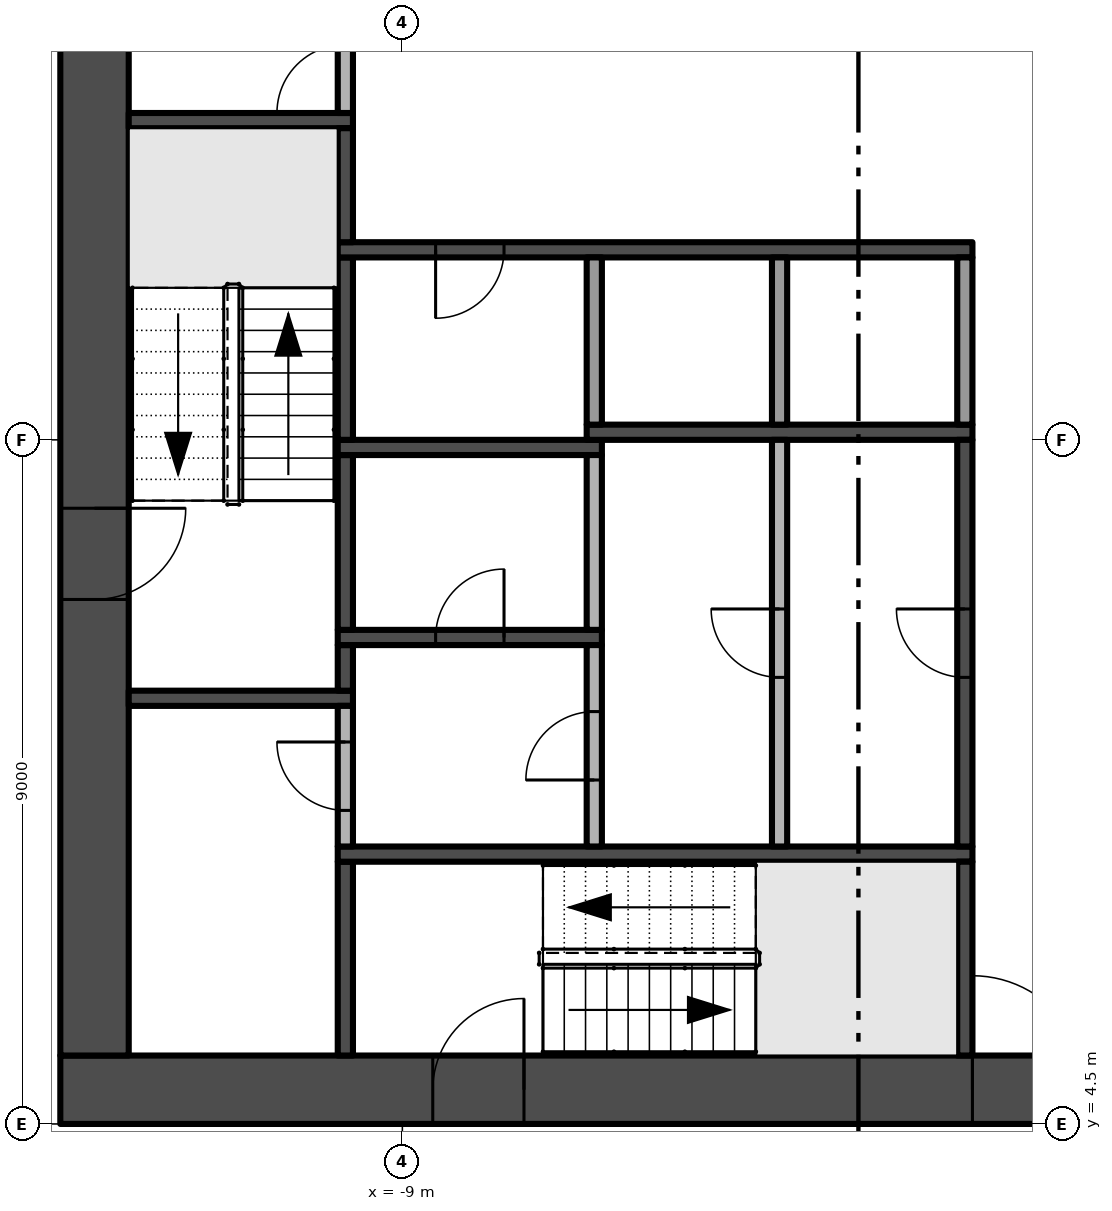
"""IFC4 building model, lengths in metres.
Left out: names, types, materials, properties, quantities, classifications, styles, units other than length and angle.
Written with IfcOpenShell. Run it as: python <this file> out.ifc"""

import sys

from ifc_helpers import new_model, si_unit, direction, frame, frame_2d, origin, place, context, subcontext, project, spatial, rectangle, extrude, element, fill, save


model = new_model("IFC4")
c1 = context("Model", 3, precision=1e-05, world=origin(), true_north=direction((0.0, 1.0)))
c2 = subcontext(c1, "Body", "Model", "MODEL_VIEW")
j1 = project(units=[si_unit("LENGTHUNIT", "METRE"), si_unit("PLANEANGLEUNIT", "RADIAN")], contexts=[c1])
p1 = place(None, origin())
s1 = spatial("IfcSite", under=j1, at=p1, CompositionType="ELEMENT")
p2 = place(p1, origin())
s2 = spatial("IfcBuilding", under=s1, at=p2, CompositionType="ELEMENT")
p3 = place(p2, frame((0.0, 0.0, 84.6)))
s3 = spatial("IfcBuildingStorey", under=s2, at=p3, CompositionType="ELEMENT", Elevation=84.6)
p4 = place(p3, frame((-13.5, 4.95, -0.3), z_axis=(0.0, 0.0, 1.0), x_axis=(1.0, 0.0, 0.0)))
e1 = element("IfcWall", 1, at=p4, inside=s3, PredefinedType="SHEAR", context=c2, shape_type="SweptSolid", body=[
    extrude(rectangle(XDim=27.0, YDim=0.9, at=frame_2d((13.5, 0.0))), origin(), (0.0, 0.0, 1.0), 3.8),
])
p5 = place(p4, frame((12.0, 0.0, 0.3)))
e2 = element("IfcOpeningElement", 2, at=p5, cuts=e1, PredefinedType="OPENING", context=c2, shape_type="SweptSolid", body=[
    extrude(rectangle(XDim=3.0, YDim=2.4, at=frame_2d((1.5, 1.2))), frame((0.0, 0.46, 0.0), z_axis=(0.0, -1.0, 0.0), x_axis=(1.0, 0.0, 0.0)), (0.0, 0.0, 1.0), 0.92),
])
p6 = place(p4, frame((4.9, 0.0, 0.3)))
e3 = element("IfcOpeningElement", 3, at=p6, cuts=e1, PredefinedType="OPENING", context=c2, shape_type="SweptSolid", body=[
    extrude(rectangle(XDim=1.2, YDim=2.2, at=frame_2d((0.6, 1.1))), frame((0.0, 0.46, 0.0), z_axis=(0.0, -1.0, 0.0), x_axis=(1.0, 0.0, 0.0)), (0.0, 0.0, 1.0), 0.92),
])
p7 = place(p4, frame((20.75, 0.0, 0.3)))
e4 = element("IfcOpeningElement", 4, at=p7, cuts=e1, PredefinedType="OPENING", context=c2, shape_type="SweptSolid", body=[
    extrude(rectangle(XDim=1.5, YDim=2.2, at=frame_2d((0.75, 1.1))), frame((0.0, 0.46, 0.0), z_axis=(0.0, -1.0, 0.0), x_axis=(1.0, 0.0, 0.0)), (0.0, 0.0, 1.0), 0.92),
])
p8 = place(p4, frame((17.4, 0.0, 0.3)))
e5 = element("IfcOpeningElement", 5, at=p8, cuts=e1, PredefinedType="OPENING", context=c2, shape_type="SweptSolid", body=[
    extrude(rectangle(XDim=1.2, YDim=2.2, at=frame_2d((0.6, 1.1))), frame((0.0, 0.46, 0.0), z_axis=(0.0, -1.0, 0.0), x_axis=(1.0, 0.0, 0.0)), (0.0, 0.0, 1.0), 0.92),
])
p9 = place(p3, frame((-13.05, 21.6, -0.3), z_axis=(0.0, 0.0, 1.0), x_axis=(0.0, -1.0, 0.0)))
e6 = element("IfcWall", 6, at=p9, inside=s3, PredefinedType="SHEAR", context=c2, shape_type="SweptSolid", body=[
    extrude(rectangle(XDim=16.2, YDim=0.9, at=frame_2d((8.1, 0.0))), origin(), (0.0, 0.0, 1.0), 3.8),
])
p10 = place(p9, frame((9.0, 0.0, 0.3)))
e7 = element("IfcOpeningElement", 7, at=p10, cuts=e6, PredefinedType="OPENING", context=c2, shape_type="SweptSolid", body=[
    extrude(rectangle(XDim=1.2, YDim=2.2, at=frame_2d((0.6, 1.1))), frame((0.0, 0.46, 0.0), z_axis=(0.0, -1.0, 0.0), x_axis=(1.0, 0.0, 0.0)), (0.0, 0.0, 1.0), 0.92),
])
for number, where, z_axis, x_axis in (
    (8, (-12.6, 10.1, 0.0), (0.0, 0.0, 1.0), (1.0, 0.0, 0.0)),
    (9, (-12.6, 17.7, 0.0), (0.0, 0.0, 1.0), (1.0, 0.0, 0.0)),
):
    element("IfcWall", number, at=place(p3, frame(where, z_axis=z_axis, x_axis=x_axis)), inside=s3, PredefinedType="SHEAR", context=c2, shape_type="SweptSolid", body=[
        extrude(rectangle(XDim=2.95, YDim=0.2, at=frame_2d((1.475, 0.0))), origin(), (0.0, 0.0, 1.0), 3.5),
    ])
p11 = place(p3, frame((-9.75, 5.4, 0.0), z_axis=(0.0, 0.0, 1.0), x_axis=(0.0, 1.0, 0.0)))
e10 = element("IfcWall", 10, at=p11, inside=s3, PredefinedType="SHEAR", context=c2, shape_type="SweptSolid", body=[
    extrude(rectangle(XDim=2.55, YDim=0.2, at=frame_2d((1.275, 0.0))), origin(), (0.0, 0.0, 1.0), 3.5),
])
p12 = place(p3, frame((-9.85, 8.05, 0.0), z_axis=(0.0, 0.0, 1.0), x_axis=(1.0, 0.0, 0.0)))
e11 = element("IfcWall", 11, at=p12, inside=s3, PredefinedType="SHEAR", context=c2, shape_type="SweptSolid", body=[
    extrude(rectangle(XDim=8.35, YDim=0.2, at=frame_2d((4.175, 0.0))), origin(), (0.0, 0.0, 1.0), 3.5),
])
p13 = place(p3, frame((-9.75, 8.15, 0.0), z_axis=(0.0, 0.0, 1.0), x_axis=(0.0, 1.0, 0.0)))
e12 = element("IfcWall", 12, at=p13, inside=s3, PredefinedType="PARTITIONING", context=c2, shape_type="SweptSolid", body=[
    extrude(rectangle(XDim=1.85, YDim=0.2, at=frame_2d((0.925, 0.0))), origin(), (0.0, 0.0, 1.0), 3.5),
])
p14 = place(p13, frame((0.475, 0.0, 0.0)))
e13 = element("IfcOpeningElement", 13, at=p14, cuts=e12, PredefinedType="OPENING", context=c2, shape_type="SweptSolid", body=[
    extrude(rectangle(XDim=0.9, YDim=2.1, at=frame_2d((0.45, 1.05))), frame((0.0, 0.11, 0.0), z_axis=(0.0, -1.0, 0.0), x_axis=(1.0, 0.0, 0.0)), (0.0, 0.0, 1.0), 0.22),
])
p15 = place(p3, frame((-9.75, 10.2, 0.0), z_axis=(0.0, 0.0, 1.0), x_axis=(0.0, 1.0, 0.0)))
e14 = element("IfcWall", 14, at=p15, inside=s3, PredefinedType="SHEAR", context=c2, shape_type="SweptSolid", body=[
    extrude(rectangle(XDim=0.6, YDim=0.2, at=frame_2d((0.3, 0.0))), origin(), (0.0, 0.0, 1.0), 3.5),
])
p16 = place(p3, frame((-9.85, 10.9, 0.0), z_axis=(0.0, 0.0, 1.0), x_axis=(1.0, 0.0, 0.0)))
e15 = element("IfcWall", 15, at=p16, inside=s3, PredefinedType="SHEAR", context=c2, shape_type="SweptSolid", body=[
    extrude(rectangle(XDim=3.475, YDim=0.2, at=frame_2d((1.738, 0.0))), origin(), (0.0, 0.0, 1.0), 3.5),
])
p17 = place(p16, frame((1.288, 0.0, 0.0)))
e16 = element("IfcOpeningElement", 16, at=p17, cuts=e15, PredefinedType="OPENING", context=c2, shape_type="SweptSolid", body=[
    extrude(rectangle(XDim=0.9, YDim=2.1, at=frame_2d((0.45, 1.05))), frame((0.0, 0.11, 0.0), z_axis=(0.0, -1.0, 0.0), x_axis=(1.0, 0.0, 0.0)), (0.0, 0.0, 1.0), 0.22),
])
p18 = place(p3, frame((-9.75, 11.0, 0.0), z_axis=(0.0, 0.0, 1.0), x_axis=(0.0, 1.0, 0.0)))
e17 = element("IfcWall", 17, at=p18, inside=s3, PredefinedType="SHEAR", context=c2, shape_type="SweptSolid", body=[
    extrude(rectangle(XDim=2.3, YDim=0.2, at=frame_2d((1.15, 0.0))), origin(), (0.0, 0.0, 1.0), 3.5),
])
p19 = place(p3, frame((-9.85, 13.4, 0.0), z_axis=(0.0, 0.0, 1.0), x_axis=(1.0, 0.0, 0.0)))
e18 = element("IfcWall", 18, at=p19, inside=s3, PredefinedType="SHEAR", context=c2, shape_type="SweptSolid", body=[
    extrude(rectangle(XDim=3.475, YDim=0.2, at=frame_2d((1.738, 0.0))), origin(), (0.0, 0.0, 1.0), 3.5),
])
p20 = place(p3, frame((-9.75, 13.5, 0.0), z_axis=(0.0, 0.0, 1.0), x_axis=(0.0, 1.0, 0.0)))
e19 = element("IfcWall", 19, at=p20, inside=s3, PredefinedType="SHEAR", context=c2, shape_type="SweptSolid", body=[
    extrude(rectangle(XDim=2.4, YDim=0.2, at=frame_2d((1.2, 0.0))), origin(), (0.0, 0.0, 1.0), 3.5),
])
p21 = place(p3, frame((-1.5, 16.0, 0.0), z_axis=(0.0, 0.0, 1.0), x_axis=(-1.0, 0.0, 0.0)))
e20 = element("IfcWall", 20, at=p21, inside=s3, PredefinedType="SHEAR", context=c2, shape_type="SweptSolid", body=[
    extrude(rectangle(XDim=8.35, YDim=0.2, at=frame_2d((4.175, 0.0))), origin(), (0.0, 0.0, 1.0), 3.5),
])
p22 = place(p21, frame((6.162, 0.0, 0.0)))
e21 = element("IfcOpeningElement", 21, at=p22, cuts=e20, PredefinedType="OPENING", context=c2, shape_type="SweptSolid", body=[
    extrude(rectangle(XDim=0.9, YDim=2.1, at=frame_2d((0.45, 1.05))), frame((0.0, 0.11, 0.0), z_axis=(0.0, -1.0, 0.0), x_axis=(1.0, 0.0, 0.0)), (0.0, 0.0, 1.0), 0.22),
])
p23 = place(p3, frame((-9.75, 16.1, 0.0), z_axis=(0.0, 0.0, 1.0), x_axis=(0.0, 1.0, 0.0)))
e22 = element("IfcWall", 22, at=p23, inside=s3, PredefinedType="SHEAR", context=c2, shape_type="SweptSolid", body=[
    extrude(rectangle(XDim=1.5, YDim=0.2, at=frame_2d((0.75, 0.0))), origin(), (0.0, 0.0, 1.0), 3.5),
])
p24 = place(p3, frame((-9.75, 17.8, 0.0), z_axis=(0.0, 0.0, 1.0), x_axis=(0.0, 1.0, 0.0)))
e23 = element("IfcWall", 23, at=p24, inside=s3, PredefinedType="PARTITIONING", context=c2, shape_type="SweptSolid", body=[
    extrude(rectangle(XDim=1.4, YDim=0.2, at=frame_2d((0.7, 0.0))), origin(), (0.0, 0.0, 1.0), 3.5),
])
p25 = place(p24, origin())
e24 = element("IfcOpeningElement", 24, at=p25, cuts=e23, PredefinedType="OPENING", context=c2, shape_type="SweptSolid", body=[
    extrude(rectangle(XDim=0.9, YDim=2.1, at=frame_2d((0.45, 1.05))), frame((0.0, 0.11, 0.0), z_axis=(0.0, -1.0, 0.0), x_axis=(1.0, 0.0, 0.0)), (0.0, 0.0, 1.0), 0.22),
])
p26 = place(p3, frame((-6.475, 8.15, 0.0), z_axis=(0.0, 0.0, 1.0), x_axis=(0.0, 1.0, 0.0)))
e25 = element("IfcWall", 25, at=p26, inside=s3, PredefinedType="PARTITIONING", context=c2, shape_type="SweptSolid", body=[
    extrude(rectangle(XDim=2.65, YDim=0.2, at=frame_2d((1.325, 0.0))), origin(), (0.0, 0.0, 1.0), 3.5),
])
p27 = place(p26, frame((0.875, 0.0, 0.0)))
e26 = element("IfcOpeningElement", 26, at=p27, cuts=e25, PredefinedType="OPENING", context=c2, shape_type="SweptSolid", body=[
    extrude(rectangle(XDim=0.9, YDim=2.1, at=frame_2d((0.45, 1.05))), frame((0.0, 0.11, 0.0), z_axis=(0.0, -1.0, 0.0), x_axis=(1.0, 0.0, 0.0)), (0.0, 0.0, 1.0), 0.22),
])
p28 = place(p3, frame((-6.475, 11.0, 0.0), z_axis=(0.0, 0.0, 1.0), x_axis=(0.0, 1.0, 0.0)))
e27 = element("IfcWall", 27, at=p28, inside=s3, PredefinedType="PARTITIONING", context=c2, shape_type="SweptSolid", body=[
    extrude(rectangle(XDim=2.3, YDim=0.2, at=frame_2d((1.15, 0.0))), origin(), (0.0, 0.0, 1.0), 3.5),
])
p29 = place(p3, frame((-6.575, 13.6, 0.0), z_axis=(0.0, 0.0, 1.0), x_axis=(1.0, 0.0, 0.0)))
e28 = element("IfcWall", 28, at=p29, inside=s3, PredefinedType="SHEAR", context=c2, shape_type="SweptSolid", body=[
    extrude(rectangle(XDim=5.075, YDim=0.2, at=frame_2d((2.538, 0.0))), origin(), (0.0, 0.0, 1.0), 3.5),
])
p30 = place(p3, frame((-6.475, 13.7, 0.0), z_axis=(0.0, 0.0, 1.0), x_axis=(0.0, 1.0, 0.0)))
e29 = element("IfcWall", 29, at=p30, inside=s3, PredefinedType="PARTITIONING", context=c2, shape_type="SweptSolid", body=[
    extrude(rectangle(XDim=2.2, YDim=0.2, at=frame_2d((1.1, 0.0))), origin(), (0.0, 0.0, 1.0), 3.5),
])
p31 = place(p3, frame((-4.037, 8.15, 0.0), z_axis=(0.0, 0.0, 1.0), x_axis=(0.0, 1.0, 0.0)))
e30 = element("IfcWall", 30, at=p31, inside=s3, PredefinedType="PARTITIONING", context=c2, shape_type="SweptSolid", body=[
    extrude(rectangle(XDim=5.35, YDim=0.2, at=frame_2d((2.675, 0.0))), origin(), (0.0, 0.0, 1.0), 3.5),
])
p32 = place(p31, frame((2.225, 0.0, 0.0)))
e31 = element("IfcOpeningElement", 31, at=p32, cuts=e30, PredefinedType="OPENING", context=c2, shape_type="SweptSolid", body=[
    extrude(rectangle(XDim=0.9, YDim=2.1, at=frame_2d((0.45, 1.05))), frame((0.0, 0.11, 0.0), z_axis=(0.0, -1.0, 0.0), x_axis=(1.0, 0.0, 0.0)), (0.0, 0.0, 1.0), 0.22),
])
p33 = place(p3, frame((-4.037, 13.7, 0.0), z_axis=(0.0, 0.0, 1.0), x_axis=(0.0, 1.0, 0.0)))
e32 = element("IfcWall", 32, at=p33, inside=s3, PredefinedType="PARTITIONING", context=c2, shape_type="SweptSolid", body=[
    extrude(rectangle(XDim=2.2, YDim=0.2, at=frame_2d((1.1, 0.0))), origin(), (0.0, 0.0, 1.0), 3.5),
])
p34 = place(p3, frame((-1.6, 5.4, 0.0), z_axis=(0.0, 0.0, 1.0), x_axis=(0.0, 1.0, 0.0)))
e33 = element("IfcWall", 33, at=p34, inside=s3, PredefinedType="SHEAR", context=c2, shape_type="SweptSolid", body=[
    extrude(rectangle(XDim=2.55, YDim=0.2, at=frame_2d((1.275, 0.0))), origin(), (0.0, 0.0, 1.0), 3.5),
])
p35 = place(p3, frame((-1.6, 8.15, 0.0), z_axis=(0.0, 0.0, 1.0), x_axis=(0.0, 1.0, 0.0)))
e34 = element("IfcWall", 34, at=p35, inside=s3, PredefinedType="SHEAR", context=c2, shape_type="SweptSolid", body=[
    extrude(rectangle(XDim=5.35, YDim=0.2, at=frame_2d((2.675, 0.0))), origin(), (0.0, 0.0, 1.0), 3.5),
])
p36 = place(p35, frame((2.225, 0.0, 0.0)))
e35 = element("IfcOpeningElement", 35, at=p36, cuts=e34, PredefinedType="OPENING", context=c2, shape_type="SweptSolid", body=[
    extrude(rectangle(XDim=0.9, YDim=2.1, at=frame_2d((0.45, 1.05))), frame((0.0, 0.11, 0.0), z_axis=(0.0, -1.0, 0.0), x_axis=(1.0, 0.0, 0.0)), (0.0, 0.0, 1.0), 0.22),
])
p37 = place(p3, frame((-1.6, 13.7, 0.0), z_axis=(0.0, 0.0, 1.0), x_axis=(0.0, 1.0, 0.0)))
e36 = element("IfcWall", 36, at=p37, inside=s3, PredefinedType="PARTITIONING", context=c2, shape_type="SweptSolid", body=[
    extrude(rectangle(XDim=2.2, YDim=0.2, at=frame_2d((1.1, 0.0))), origin(), (0.0, 0.0, 1.0), 3.5),
])
p38 = place(p5, frame((3.0, 0.0, 0.0), z_axis=(0.0, 0.0, 1.0), x_axis=(-1.0, 0.0, 0.0)))
e37 = element("IfcDoor", 37, at=p38, inside=s3, OperationType="DOUBLE_DOOR_SINGLE_SWING", PredefinedType="DOOR", context=c2, shape_type="SweptSolid", body=[
    extrude(rectangle(XDim=3.0, YDim=2.4, at=frame_2d((1.5, 1.2))), frame((0.0, 0.025, 0.0), z_axis=(0.0, -1.0, 0.0), x_axis=(1.0, 0.0, 0.0)), (0.0, 0.0, 1.0), 0.05),
])
fill(e2, e37)
p39 = place(p10, frame((1.2, 0.0, 0.0), z_axis=(0.0, 0.0, 1.0), x_axis=(-1.0, 0.0, 0.0)))
e38 = element("IfcDoor", 38, at=p39, inside=s3, OperationType="SINGLE_SWING_RIGHT", PredefinedType="DOOR", context=c2, shape_type="SweptSolid", body=[
    extrude(rectangle(XDim=1.2, YDim=2.2, at=frame_2d((0.6, 1.1))), frame((0.0, 0.025, 0.0), z_axis=(0.0, -1.0, 0.0), x_axis=(1.0, 0.0, 0.0)), (0.0, 0.0, 1.0), 0.05),
])
fill(e7, e38)
p40 = place(p6, frame((1.2, 0.0, 0.0), z_axis=(0.0, 0.0, 1.0), x_axis=(-1.0, 0.0, 0.0)))
e39 = element("IfcDoor", 39, at=p40, inside=s3, OperationType="SINGLE_SWING_LEFT", PredefinedType="DOOR", context=c2, shape_type="SweptSolid", body=[
    extrude(rectangle(XDim=1.2, YDim=2.2, at=frame_2d((0.6, 1.1))), frame((0.0, 0.025, 0.0), z_axis=(0.0, -1.0, 0.0), x_axis=(1.0, 0.0, 0.0)), (0.0, 0.0, 1.0), 0.05),
])
fill(e3, e39)
p41 = place(p22, origin())
e40 = element("IfcDoor", 40, at=p41, inside=s3, OperationType="SINGLE_SWING_RIGHT", PredefinedType="DOOR", context=c2, shape_type="SweptSolid", body=[
    extrude(rectangle(XDim=0.9, YDim=2.1, at=frame_2d((0.45, 1.05))), frame((0.0, 0.025, 0.0), z_axis=(0.0, -1.0, 0.0), x_axis=(1.0, 0.0, 0.0)), (0.0, 0.0, 1.0), 0.05),
])
fill(e21, e40)
p42 = place(p36, origin())
e41 = element("IfcDoor", 41, at=p42, inside=s3, OperationType="SINGLE_SWING_RIGHT", PredefinedType="DOOR", context=c2, shape_type="SweptSolid", body=[
    extrude(rectangle(XDim=0.9, YDim=2.1, at=frame_2d((0.45, 1.05))), frame((0.0, 0.025, 0.0), z_axis=(0.0, -1.0, 0.0), x_axis=(1.0, 0.0, 0.0)), (0.0, 0.0, 1.0), 0.05),
])
fill(e35, e41)
p43 = place(p25, origin())
e42 = element("IfcDoor", 42, at=p43, inside=s3, OperationType="SINGLE_SWING_LEFT", PredefinedType="DOOR", context=c2, shape_type="SweptSolid", body=[
    extrude(rectangle(XDim=0.9, YDim=2.1, at=frame_2d((0.45, 1.05))), frame((0.0, 0.025, 0.0), z_axis=(0.0, -1.0, 0.0), x_axis=(1.0, 0.0, 0.0)), (0.0, 0.0, 1.0), 0.05),
])
fill(e24, e42)
p44 = place(p32, origin())
e43 = element("IfcDoor", 43, at=p44, inside=s3, OperationType="SINGLE_SWING_RIGHT", PredefinedType="DOOR", context=c2, shape_type="SweptSolid", body=[
    extrude(rectangle(XDim=0.9, YDim=2.1, at=frame_2d((0.45, 1.05))), frame((0.0, 0.025, 0.0), z_axis=(0.0, -1.0, 0.0), x_axis=(1.0, 0.0, 0.0)), (0.0, 0.0, 1.0), 0.05),
])
fill(e31, e43)
p45 = place(p27, origin())
e44 = element("IfcDoor", 44, at=p45, inside=s3, OperationType="SINGLE_SWING_LEFT", PredefinedType="DOOR", context=c2, shape_type="SweptSolid", body=[
    extrude(rectangle(XDim=0.9, YDim=2.1, at=frame_2d((0.45, 1.05))), frame((0.0, 0.025, 0.0), z_axis=(0.0, -1.0, 0.0), x_axis=(1.0, 0.0, 0.0)), (0.0, 0.0, 1.0), 0.05),
])
fill(e26, e44)
p46 = place(p17, origin())
e45 = element("IfcDoor", 45, at=p46, inside=s3, OperationType="SINGLE_SWING_RIGHT", PredefinedType="DOOR", context=c2, shape_type="SweptSolid", body=[
    extrude(rectangle(XDim=0.9, YDim=2.1, at=frame_2d((0.45, 1.05))), frame((0.0, 0.025, 0.0), z_axis=(0.0, -1.0, 0.0), x_axis=(1.0, 0.0, 0.0)), (0.0, 0.0, 1.0), 0.05),
])
fill(e16, e45)
p47 = place(p14, origin())
e46 = element("IfcDoor", 46, at=p47, inside=s3, OperationType="SINGLE_SWING_RIGHT", PredefinedType="DOOR", context=c2, shape_type="SweptSolid", body=[
    extrude(rectangle(XDim=0.9, YDim=2.1, at=frame_2d((0.45, 1.05))), frame((0.0, 0.025, 0.0), z_axis=(0.0, -1.0, 0.0), x_axis=(1.0, 0.0, 0.0)), (0.0, 0.0, 1.0), 0.05),
])
fill(e13, e46)
save(model, sys.argv[1])
